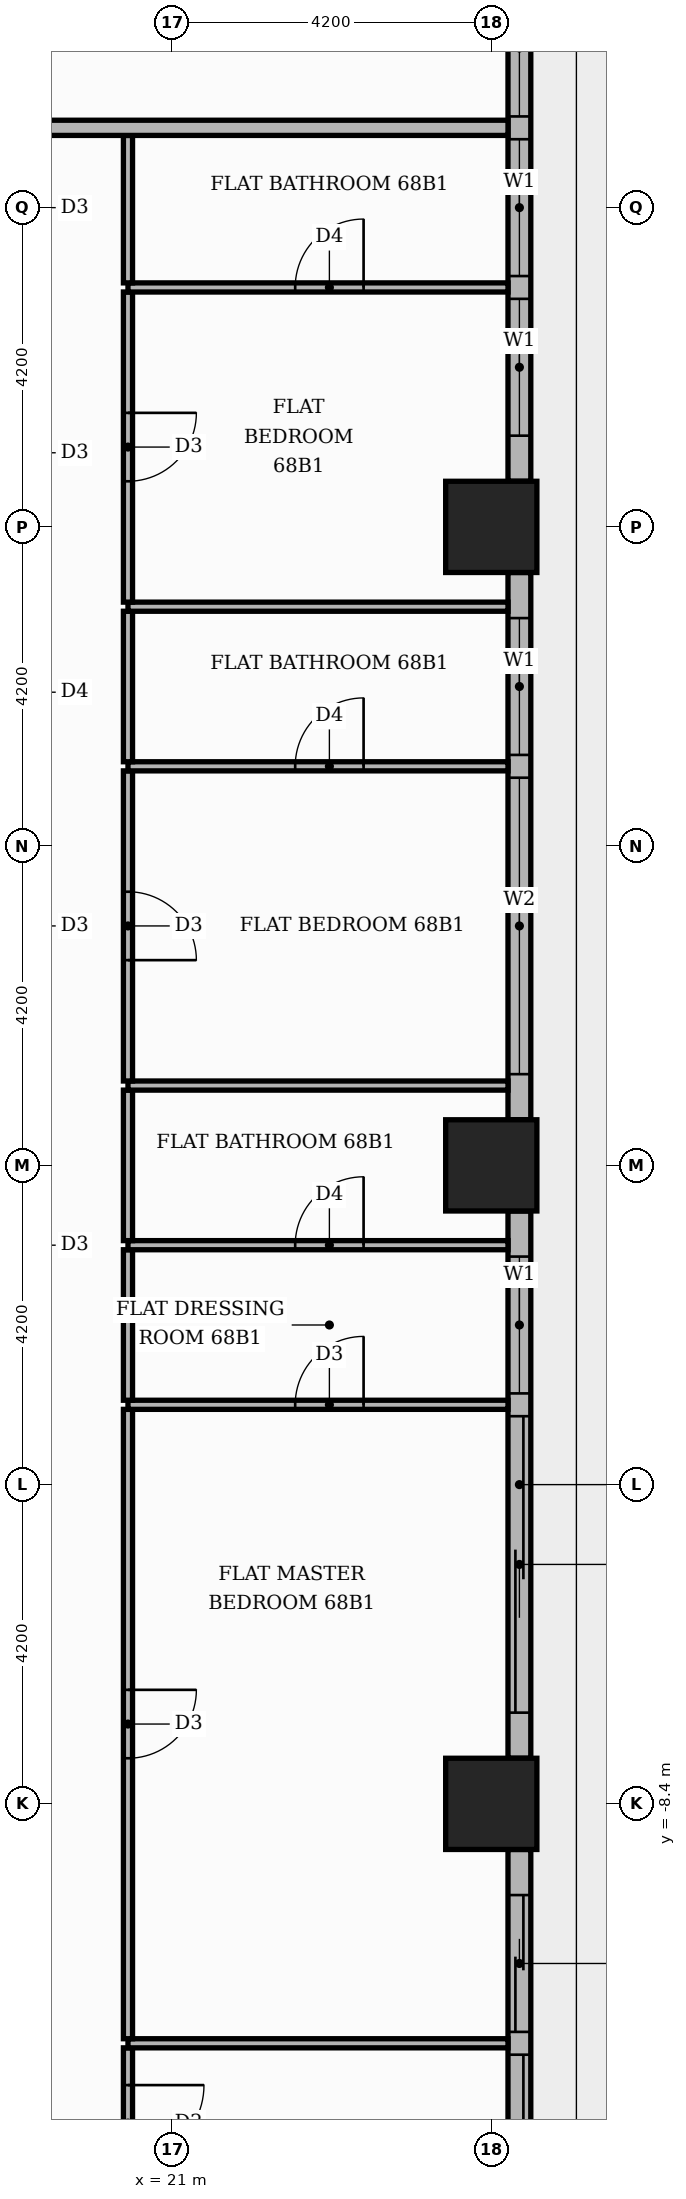
"""IFC4 building model, lengths in metres.
Left out: names, types, materials, properties, quantities, classifications, styles, units other than length and angle.
Written with IfcOpenShell. Run it as: python <this file> out.ifc"""

import sys

from ifc_helpers import new_model, si_unit, direction, frame, frame_2d, origin, origin_2d, place, context, subcontext, project, spatial, rectangle, extrude, element, fill, save


model = new_model("IFC4")
c1 = context("Model", 3, precision=1e-05, world=origin(), true_north=direction((0.0, 1.0)))
c2 = subcontext(c1, "Body", "Model", "MODEL_VIEW")
j1 = project(units=[si_unit("LENGTHUNIT", "METRE"), si_unit("PLANEANGLEUNIT", "RADIAN")], contexts=[c1])
p1 = place(None, origin())
s1 = spatial("IfcSite", under=j1, at=p1, CompositionType="ELEMENT")
p2 = place(p1, origin())
s2 = spatial("IfcBuilding", under=s1, at=p2, CompositionType="ELEMENT")
p3 = place(p2, frame((0.0, 0.0, 283.5)))
s3 = spatial("IfcBuildingStorey", under=s2, at=p3, CompositionType="ELEMENT", Elevation=283.5)
for number, where, z_axis, x_axis in (
    (1, (25.2, 0.0, 0.0), (0.0, 0.0, 1.0), (1.0, 0.0, 0.0)),
    (2, (25.2, 8.4, 0.0), (0.0, 0.0, 1.0), (1.0, 0.0, 0.0)),
    (3, (25.2, -8.4, 0.0), (0.0, 0.0, 1.0), (1.0, 0.0, 0.0)),
):
    element("IfcColumn", number, at=place(p3, frame(where, z_axis=z_axis, x_axis=x_axis)), inside=s3, PredefinedType="COLUMN", context=c2, shape_type="SweptSolid", body=[
        extrude(rectangle(XDim=1.2, YDim=1.2, at=origin_2d()), origin(), (0.0, 0.0, 1.0), 3.9),
    ])
p4 = place(p3, frame((25.57, -16.2, 0.0), z_axis=(0.0, 0.0, 1.0), x_axis=(0.0, 1.0, 0.0)))
e4 = element("IfcWall", 4, at=p4, inside=s3, PredefinedType="STANDARD", context=c2, shape_type="SweptSolid", body=[
    extrude(rectangle(XDim=7.2, YDim=0.3, at=frame_2d((3.6, 0.0))), origin(), (0.0, 0.0, 1.0), 3.4),
])
p5 = place(p4, frame((0.6, 0.0, 0.0)))
e5 = element("IfcOpeningElement", 5, at=p5, cuts=e4, PredefinedType="OPENING", context=c2, shape_type="SweptSolid", body=[
    extrude(rectangle(XDim=3.9, YDim=2.4, at=frame_2d((1.95, 1.2))), frame((0.0, 0.16, 0.0), z_axis=(0.0, -1.0, 0.0), x_axis=(1.0, 0.0, 0.0)), (0.0, 0.0, 1.0), 0.32),
])
p6 = place(p4, frame((4.8, 0.0, 0.0)))
e6 = element("IfcOpeningElement", 6, at=p6, cuts=e4, PredefinedType="OPENING", context=c2, shape_type="SweptSolid", body=[
    extrude(rectangle(XDim=1.8, YDim=2.4, at=frame_2d((0.9, 1.2))), frame((0.0, 0.16, 0.0), z_axis=(0.0, -1.0, 0.0), x_axis=(1.0, 0.0, 0.0)), (0.0, 0.0, 1.0), 0.32),
])
p7 = place(p3, frame((25.57, -7.8, 0.0), z_axis=(0.0, 0.0, 1.0), x_axis=(0.0, 1.0, 0.0)))
e7 = element("IfcWall", 7, at=p7, inside=s3, PredefinedType="STANDARD", context=c2, shape_type="SweptSolid", body=[
    extrude(rectangle(XDim=7.2, YDim=0.3, at=frame_2d((3.6, 0.0))), origin(), (0.0, 0.0, 1.0), 3.4),
])
p8 = place(p7, frame((0.6, 0.0, 0.0)))
e8 = element("IfcOpeningElement", 8, at=p8, cuts=e7, PredefinedType="OPENING", context=c2, shape_type="SweptSolid", body=[
    extrude(rectangle(XDim=3.9, YDim=2.4, at=frame_2d((1.95, 1.2))), frame((0.0, 0.16, 0.0), z_axis=(0.0, -1.0, 0.0), x_axis=(1.0, 0.0, 0.0)), (0.0, 0.0, 1.0), 0.32),
])
p9 = place(p7, frame((4.8, 0.0, 0.9)))
e9 = element("IfcOpeningElement", 9, at=p9, cuts=e7, PredefinedType="OPENING", context=c2, shape_type="SweptSolid", body=[
    extrude(rectangle(XDim=1.8, YDim=2.1, at=frame_2d((0.9, 1.05))), frame((0.0, 0.16, 0.0), z_axis=(0.0, -1.0, 0.0), x_axis=(1.0, 0.0, 0.0)), (0.0, 0.0, 1.0), 0.32),
])
p10 = place(p3, frame((25.57, 0.6, 0.0), z_axis=(0.0, 0.0, 1.0), x_axis=(0.0, 1.0, 0.0)))
e10 = element("IfcWall", 10, at=p10, inside=s3, PredefinedType="STANDARD", context=c2, shape_type="SweptSolid", body=[
    extrude(rectangle(XDim=7.2, YDim=0.3, at=frame_2d((3.6, 0.0))), origin(), (0.0, 0.0, 1.0), 3.4),
])
p11 = place(p10, frame((0.6, 0.0, 0.9)))
e11 = element("IfcOpeningElement", 11, at=p11, cuts=e10, PredefinedType="OPENING", context=c2, shape_type="SweptSolid", body=[
    extrude(rectangle(XDim=3.9, YDim=2.1, at=frame_2d((1.95, 1.05))), frame((0.0, 0.16, 0.0), z_axis=(0.0, -1.0, 0.0), x_axis=(1.0, 0.0, 0.0)), (0.0, 0.0, 1.0), 0.32),
])
p12 = place(p10, frame((4.8, 0.0, 0.9)))
e12 = element("IfcOpeningElement", 12, at=p12, cuts=e10, PredefinedType="OPENING", context=c2, shape_type="SweptSolid", body=[
    extrude(rectangle(XDim=1.8, YDim=2.1, at=frame_2d((0.9, 1.05))), frame((0.0, 0.16, 0.0), z_axis=(0.0, -1.0, 0.0), x_axis=(1.0, 0.0, 0.0)), (0.0, 0.0, 1.0), 0.32),
])
p13 = place(p3, frame((25.57, 9.0, 0.0), z_axis=(0.0, 0.0, 1.0), x_axis=(0.0, 1.0, 0.0)))
e13 = element("IfcWall", 13, at=p13, inside=s3, PredefinedType="STANDARD", context=c2, shape_type="SweptSolid", body=[
    extrude(rectangle(XDim=7.2, YDim=0.3, at=frame_2d((3.6, 0.0))), origin(), (0.0, 0.0, 1.0), 3.4),
])
p14 = place(p13, frame((0.6, 0.0, 0.9)))
e14 = element("IfcOpeningElement", 14, at=p14, cuts=e13, PredefinedType="OPENING", context=c2, shape_type="SweptSolid", body=[
    extrude(rectangle(XDim=1.8, YDim=2.1, at=frame_2d((0.9, 1.05))), frame((0.0, 0.16, 0.0), z_axis=(0.0, -1.0, 0.0), x_axis=(1.0, 0.0, 0.0)), (0.0, 0.0, 1.0), 0.32),
])
p15 = place(p13, frame((2.7, 0.0, 0.9)))
e15 = element("IfcOpeningElement", 15, at=p15, cuts=e13, PredefinedType="OPENING", context=c2, shape_type="SweptSolid", body=[
    extrude(rectangle(XDim=1.8, YDim=2.1, at=frame_2d((0.9, 1.05))), frame((0.0, 0.16, 0.0), z_axis=(0.0, -1.0, 0.0), x_axis=(1.0, 0.0, 0.0)), (0.0, 0.0, 1.0), 0.32),
])
p16 = place(p13, frame((4.8, 0.0, 0.9)))
e16 = element("IfcOpeningElement", 16, at=p16, cuts=e13, PredefinedType="OPENING", context=c2, shape_type="SweptSolid", body=[
    extrude(rectangle(XDim=1.8, YDim=2.1, at=frame_2d((0.9, 1.05))), frame((0.0, 0.16, 0.0), z_axis=(0.0, -1.0, 0.0), x_axis=(1.0, 0.0, 0.0)), (0.0, 0.0, 1.0), 0.32),
])
p17 = place(p3, frame((20.42, -13.59, 0.0), z_axis=(0.0, 0.0, 1.0), x_axis=(0.0, 1.0, 0.0)))
e17 = element("IfcWall", 17, at=p17, inside=s3, PredefinedType="PARTITIONING", context=c2, shape_type="SweptSolid", body=[
    extrude(rectangle(XDim=1.98, YDim=0.12, at=frame_2d((0.99, 0.0))), origin(), (0.0, 0.0, 1.0), 3.4),
])
p18 = place(p17, frame((0.49, 0.0, 0.0)))
e18 = element("IfcOpeningElement", 18, at=p18, cuts=e17, PredefinedType="OPENING", context=c2, shape_type="SweptSolid", body=[
    extrude(rectangle(XDim=1.0, YDim=2.1, at=frame_2d((0.5, 1.05))), frame((0.0, 0.07, 0.0), z_axis=(0.0, -1.0, 0.0), x_axis=(1.0, 0.0, 0.0)), (0.0, 0.0, 1.0), 0.14),
])
p19 = place(p3, frame((20.42, -11.55, 0.0), z_axis=(0.0, 0.0, 1.0), x_axis=(1.0, 0.0, 0.0)))
e19 = element("IfcWall", 19, at=p19, inside=s3, PredefinedType="PARTITIONING", context=c2, shape_type="SweptSolid", body=[
    extrude(rectangle(XDim=5.0, YDim=0.12, at=frame_2d((2.5, 0.0))), origin(), (0.0, 0.0, 1.0), 3.4),
])
p20 = place(p3, frame((20.42, -11.49, 0.0), z_axis=(0.0, 0.0, 1.0), x_axis=(0.0, 1.0, 0.0)))
e20 = element("IfcWall", 20, at=p20, inside=s3, PredefinedType="PARTITIONING", context=c2, shape_type="SweptSolid", body=[
    extrude(rectangle(XDim=8.28, YDim=0.12, at=frame_2d((4.14, 0.0))), origin(), (0.0, 0.0, 1.0), 3.4),
])
p21 = place(p20, frame((3.69, 0.0, 0.0)))
e21 = element("IfcOpeningElement", 21, at=p21, cuts=e20, PredefinedType="OPENING", context=c2, shape_type="SweptSolid", body=[
    extrude(rectangle(XDim=0.9, YDim=2.1, at=frame_2d((0.45, 1.05))), frame((0.0, 0.07, 0.0), z_axis=(0.0, -1.0, 0.0), x_axis=(1.0, 0.0, 0.0)), (0.0, 0.0, 1.0), 0.14),
])
p22 = place(p3, frame((20.42, -3.15, 0.0), z_axis=(0.0, 0.0, 1.0), x_axis=(1.0, 0.0, 0.0)))
e22 = element("IfcWall", 22, at=p22, inside=s3, PredefinedType="PARTITIONING", context=c2, shape_type="SweptSolid", body=[
    extrude(rectangle(XDim=5.0, YDim=0.12, at=frame_2d((2.5, 0.0))), origin(), (0.0, 0.0, 1.0), 3.4),
])
p23 = place(p22, frame((2.2, 0.0, 0.0)))
e23 = element("IfcOpeningElement", 23, at=p23, cuts=e22, PredefinedType="OPENING", context=c2, shape_type="SweptSolid", body=[
    extrude(rectangle(XDim=0.9, YDim=2.1, at=frame_2d((0.45, 1.05))), frame((0.0, 0.07, 0.0), z_axis=(0.0, -1.0, 0.0), x_axis=(1.0, 0.0, 0.0)), (0.0, 0.0, 1.0), 0.14),
])
p24 = place(p3, frame((20.42, -3.09, 0.0), z_axis=(0.0, 0.0, 1.0), x_axis=(0.0, 1.0, 0.0)))
e24 = element("IfcWall", 24, at=p24, inside=s3, PredefinedType="PARTITIONING", context=c2, shape_type="SweptSolid", body=[
    extrude(rectangle(XDim=1.98, YDim=0.12, at=frame_2d((0.99, 0.0))), origin(), (0.0, 0.0, 1.0), 3.4),
])
p25 = place(p3, frame((20.42, -1.05, 0.0), z_axis=(0.0, 0.0, 1.0), x_axis=(1.0, 0.0, 0.0)))
e25 = element("IfcWall", 25, at=p25, inside=s3, PredefinedType="PARTITIONING", context=c2, shape_type="SweptSolid", body=[
    extrude(rectangle(XDim=5.0, YDim=0.12, at=frame_2d((2.5, 0.0))), origin(), (0.0, 0.0, 1.0), 3.4),
])
p26 = place(p25, frame((2.2, 0.0, 0.0)))
e26 = element("IfcOpeningElement", 26, at=p26, cuts=e25, PredefinedType="OPENING", context=c2, shape_type="SweptSolid", body=[
    extrude(rectangle(XDim=0.9, YDim=2.1, at=frame_2d((0.45, 1.05))), frame((0.0, 0.07, 0.0), z_axis=(0.0, -1.0, 0.0), x_axis=(1.0, 0.0, 0.0)), (0.0, 0.0, 1.0), 0.14),
])
p27 = place(p3, frame((20.42, -0.99, 0.0), z_axis=(0.0, 0.0, 1.0), x_axis=(0.0, 1.0, 0.0)))
e27 = element("IfcWall", 27, at=p27, inside=s3, PredefinedType="PARTITIONING", context=c2, shape_type="SweptSolid", body=[
    extrude(rectangle(XDim=1.98, YDim=0.12, at=frame_2d((0.99, 0.0))), origin(), (0.0, 0.0, 1.0), 3.4),
])
p28 = place(p3, frame((20.42, 1.05, 0.0), z_axis=(0.0, 0.0, 1.0), x_axis=(1.0, 0.0, 0.0)))
e28 = element("IfcWall", 28, at=p28, inside=s3, PredefinedType="PARTITIONING", context=c2, shape_type="SweptSolid", body=[
    extrude(rectangle(XDim=5.0, YDim=0.12, at=frame_2d((2.5, 0.0))), origin(), (0.0, 0.0, 1.0), 3.4),
])
p29 = place(p3, frame((20.42, 1.11, 0.0), z_axis=(0.0, 0.0, 1.0), x_axis=(0.0, 1.0, 0.0)))
e29 = element("IfcWall", 29, at=p29, inside=s3, PredefinedType="PARTITIONING", context=c2, shape_type="SweptSolid", body=[
    extrude(rectangle(XDim=4.08, YDim=0.12, at=frame_2d((2.04, 0.0))), origin(), (0.0, 0.0, 1.0), 3.4),
])
p30 = place(p29, frame((1.59, 0.0, 0.0)))
e30 = element("IfcOpeningElement", 30, at=p30, cuts=e29, PredefinedType="OPENING", context=c2, shape_type="SweptSolid", body=[
    extrude(rectangle(XDim=0.9, YDim=2.1, at=frame_2d((0.45, 1.05))), frame((0.0, 0.07, 0.0), z_axis=(0.0, -1.0, 0.0), x_axis=(1.0, 0.0, 0.0)), (0.0, 0.0, 1.0), 0.14),
])
p31 = place(p3, frame((20.42, 5.25, 0.0), z_axis=(0.0, 0.0, 1.0), x_axis=(1.0, 0.0, 0.0)))
e31 = element("IfcWall", 31, at=p31, inside=s3, PredefinedType="PARTITIONING", context=c2, shape_type="SweptSolid", body=[
    extrude(rectangle(XDim=5.0, YDim=0.12, at=frame_2d((2.5, 0.0))), origin(), (0.0, 0.0, 1.0), 3.4),
])
p32 = place(p31, frame((2.2, 0.0, 0.0)))
e32 = element("IfcOpeningElement", 32, at=p32, cuts=e31, PredefinedType="OPENING", context=c2, shape_type="SweptSolid", body=[
    extrude(rectangle(XDim=0.9, YDim=2.1, at=frame_2d((0.45, 1.05))), frame((0.0, 0.07, 0.0), z_axis=(0.0, -1.0, 0.0), x_axis=(1.0, 0.0, 0.0)), (0.0, 0.0, 1.0), 0.14),
])
p33 = place(p3, frame((20.42, 5.31, 0.0), z_axis=(0.0, 0.0, 1.0), x_axis=(0.0, 1.0, 0.0)))
e33 = element("IfcWall", 33, at=p33, inside=s3, PredefinedType="PARTITIONING", context=c2, shape_type="SweptSolid", body=[
    extrude(rectangle(XDim=1.98, YDim=0.12, at=frame_2d((0.99, 0.0))), origin(), (0.0, 0.0, 1.0), 3.4),
])
p34 = place(p3, frame((20.42, 7.35, 0.0), z_axis=(0.0, 0.0, 1.0), x_axis=(1.0, 0.0, 0.0)))
e34 = element("IfcWall", 34, at=p34, inside=s3, PredefinedType="PARTITIONING", context=c2, shape_type="SweptSolid", body=[
    extrude(rectangle(XDim=5.0, YDim=0.12, at=frame_2d((2.5, 0.0))), origin(), (0.0, 0.0, 1.0), 3.4),
])
p35 = place(p3, frame((20.42, 7.41, 0.0), z_axis=(0.0, 0.0, 1.0), x_axis=(0.0, 1.0, 0.0)))
e35 = element("IfcWall", 35, at=p35, inside=s3, PredefinedType="PARTITIONING", context=c2, shape_type="SweptSolid", body=[
    extrude(rectangle(XDim=4.08, YDim=0.12, at=frame_2d((2.04, 0.0))), origin(), (0.0, 0.0, 1.0), 3.4),
])
p36 = place(p35, frame((1.59, 0.0, 0.0)))
e36 = element("IfcOpeningElement", 36, at=p36, cuts=e35, PredefinedType="OPENING", context=c2, shape_type="SweptSolid", body=[
    extrude(rectangle(XDim=0.9, YDim=2.1, at=frame_2d((0.45, 1.05))), frame((0.0, 0.07, 0.0), z_axis=(0.0, -1.0, 0.0), x_axis=(1.0, 0.0, 0.0)), (0.0, 0.0, 1.0), 0.14),
])
p37 = place(p3, frame((20.42, 11.55, 0.0), z_axis=(0.0, 0.0, 1.0), x_axis=(1.0, 0.0, 0.0)))
e37 = element("IfcWall", 37, at=p37, inside=s3, PredefinedType="PARTITIONING", context=c2, shape_type="SweptSolid", body=[
    extrude(rectangle(XDim=5.0, YDim=0.12, at=frame_2d((2.5, 0.0))), origin(), (0.0, 0.0, 1.0), 3.4),
])
p38 = place(p37, frame((2.2, 0.0, 0.0)))
e38 = element("IfcOpeningElement", 38, at=p38, cuts=e37, PredefinedType="OPENING", context=c2, shape_type="SweptSolid", body=[
    extrude(rectangle(XDim=0.9, YDim=2.1, at=frame_2d((0.45, 1.05))), frame((0.0, 0.07, 0.0), z_axis=(0.0, -1.0, 0.0), x_axis=(1.0, 0.0, 0.0)), (0.0, 0.0, 1.0), 0.14),
])
p39 = place(p3, frame((20.42, 11.61, 0.0), z_axis=(0.0, 0.0, 1.0), x_axis=(0.0, 1.0, 0.0)))
e39 = element("IfcWall", 39, at=p39, inside=s3, PredefinedType="PARTITIONING", context=c2, shape_type="SweptSolid", body=[
    extrude(rectangle(XDim=1.94, YDim=0.12, at=frame_2d((0.97, 0.0))), origin(), (0.0, 0.0, 1.0), 3.4),
])
p40 = place(p3, frame((-13.65, 13.65, 0.0), z_axis=(0.0, 0.0, 1.0), x_axis=(1.0, 0.0, 0.0)))
e40 = element("IfcWall", 40, at=p40, inside=s3, PredefinedType="PARTITIONING", context=c2, shape_type="SweptSolid", body=[
    extrude(rectangle(XDim=39.07, YDim=0.2, at=frame_2d((19.535, 0.0))), origin(), (0.0, 0.0, 1.0), 3.4),
])
p41 = place(p40, frame((23.6, 0.0, 0.0)))
e41 = element("IfcOpeningElement", 41, at=p41, cuts=e40, PredefinedType="OPENING", context=c2, shape_type="SweptSolid", body=[
    extrude(rectangle(XDim=1.1, YDim=2.4, at=frame_2d((0.55, 1.2))), frame((0.0, 0.11, 0.0), z_axis=(0.0, -1.0, 0.0), x_axis=(1.0, 0.0, 0.0)), (0.0, 0.0, 1.0), 0.22),
])
p42 = place(p5, origin())
e42 = element("IfcDoor", 42, at=p42, inside=s3, OperationType="SLIDING_TO_LEFT", PredefinedType="DOOR", context=c2, shape_type="SweptSolid", body=[
    extrude(rectangle(XDim=3.9, YDim=2.4, at=frame_2d((1.95, 1.2))), frame((0.0, 0.025, 0.0), z_axis=(0.0, -1.0, 0.0), x_axis=(1.0, 0.0, 0.0)), (0.0, 0.0, 1.0), 0.05),
])
fill(e5, e42)
p43 = place(p6, origin())
e43 = element("IfcDoor", 43, at=p43, inside=s3, OperationType="SLIDING_TO_RIGHT", PredefinedType="DOOR", context=c2, shape_type="SweptSolid", body=[
    extrude(rectangle(XDim=1.8, YDim=2.4, at=frame_2d((0.9, 1.2))), frame((0.0, 0.025, 0.0), z_axis=(0.0, -1.0, 0.0), x_axis=(1.0, 0.0, 0.0)), (0.0, 0.0, 1.0), 0.05),
])
fill(e6, e43)
p44 = place(p8, origin())
e44 = element("IfcDoor", 44, at=p44, inside=s3, OperationType="SLIDING_TO_LEFT", PredefinedType="DOOR", context=c2, shape_type="SweptSolid", body=[
    extrude(rectangle(XDim=3.9, YDim=2.4, at=frame_2d((1.95, 1.2))), frame((0.0, 0.025, 0.0), z_axis=(0.0, -1.0, 0.0), x_axis=(1.0, 0.0, 0.0)), (0.0, 0.0, 1.0), 0.05),
])
fill(e8, e44)
p45 = place(p9, origin())
e45 = element("IfcWindow", 45, at=p45, inside=s3, PartitioningType="SINGLE_PANEL", PredefinedType="WINDOW", context=c2, shape_type="SweptSolid", body=[
    extrude(rectangle(XDim=1.8, YDim=2.1, at=frame_2d((0.9, 1.05))), frame((0.0, 0.03, 0.0), z_axis=(0.0, -1.0, 0.0), x_axis=(1.0, 0.0, 0.0)), (0.0, 0.0, 1.0), 0.06),
])
fill(e9, e45)
p46 = place(p11, origin())
e46 = element("IfcWindow", 46, at=p46, inside=s3, PartitioningType="SINGLE_PANEL", PredefinedType="WINDOW", context=c2, shape_type="SweptSolid", body=[
    extrude(rectangle(XDim=3.9, YDim=2.1, at=frame_2d((1.95, 1.05))), frame((0.0, 0.03, 0.0), z_axis=(0.0, -1.0, 0.0), x_axis=(1.0, 0.0, 0.0)), (0.0, 0.0, 1.0), 0.06),
])
fill(e11, e46)
p47 = place(p12, origin())
e47 = element("IfcWindow", 47, at=p47, inside=s3, PartitioningType="SINGLE_PANEL", PredefinedType="WINDOW", context=c2, shape_type="SweptSolid", body=[
    extrude(rectangle(XDim=1.8, YDim=2.1, at=frame_2d((0.9, 1.05))), frame((0.0, 0.03, 0.0), z_axis=(0.0, -1.0, 0.0), x_axis=(1.0, 0.0, 0.0)), (0.0, 0.0, 1.0), 0.06),
])
fill(e12, e47)
p48 = place(p14, origin())
e48 = element("IfcWindow", 48, at=p48, inside=s3, PartitioningType="SINGLE_PANEL", PredefinedType="WINDOW", context=c2, shape_type="SweptSolid", body=[
    extrude(rectangle(XDim=1.8, YDim=2.1, at=frame_2d((0.9, 1.05))), frame((0.0, 0.03, 0.0), z_axis=(0.0, -1.0, 0.0), x_axis=(1.0, 0.0, 0.0)), (0.0, 0.0, 1.0), 0.06),
])
fill(e14, e48)
p49 = place(p15, origin())
e49 = element("IfcWindow", 49, at=p49, inside=s3, PartitioningType="SINGLE_PANEL", PredefinedType="WINDOW", context=c2, shape_type="SweptSolid", body=[
    extrude(rectangle(XDim=1.8, YDim=2.1, at=frame_2d((0.9, 1.05))), frame((0.0, 0.03, 0.0), z_axis=(0.0, -1.0, 0.0), x_axis=(1.0, 0.0, 0.0)), (0.0, 0.0, 1.0), 0.06),
])
fill(e15, e49)
p50 = place(p16, origin())
e50 = element("IfcWindow", 50, at=p50, inside=s3, PartitioningType="SINGLE_PANEL", PredefinedType="WINDOW", context=c2, shape_type="SweptSolid", body=[
    extrude(rectangle(XDim=1.8, YDim=2.1, at=frame_2d((0.9, 1.05))), frame((0.0, 0.03, 0.0), z_axis=(0.0, -1.0, 0.0), x_axis=(1.0, 0.0, 0.0)), (0.0, 0.0, 1.0), 0.06),
])
fill(e16, e50)
p51 = place(p18, frame((1.0, 0.0, 0.0), z_axis=(0.0, 0.0, 1.0), x_axis=(-1.0, 0.0, 0.0)))
e51 = element("IfcDoor", 51, at=p51, inside=s3, OperationType="SINGLE_SWING_RIGHT", PredefinedType="DOOR", context=c2, shape_type="SweptSolid", body=[
    extrude(rectangle(XDim=1.0, YDim=2.1, at=frame_2d((0.5, 1.05))), frame((0.0, 0.025, 0.0), z_axis=(0.0, -1.0, 0.0), x_axis=(1.0, 0.0, 0.0)), (0.0, 0.0, 1.0), 0.05),
])
fill(e18, e51)
p52 = place(p21, frame((0.9, 0.0, 0.0), z_axis=(0.0, 0.0, 1.0), x_axis=(-1.0, 0.0, 0.0)))
e52 = element("IfcDoor", 52, at=p52, inside=s3, OperationType="SINGLE_SWING_RIGHT", PredefinedType="DOOR", context=c2, shape_type="SweptSolid", body=[
    extrude(rectangle(XDim=0.9, YDim=2.1, at=frame_2d((0.45, 1.05))), frame((0.0, 0.025, 0.0), z_axis=(0.0, -1.0, 0.0), x_axis=(1.0, 0.0, 0.0)), (0.0, 0.0, 1.0), 0.05),
])
fill(e21, e52)
p53 = place(p23, origin())
e53 = element("IfcDoor", 53, at=p53, inside=s3, OperationType="SINGLE_SWING_RIGHT", PredefinedType="DOOR", context=c2, shape_type="SweptSolid", body=[
    extrude(rectangle(XDim=0.9, YDim=2.1, at=frame_2d((0.45, 1.05))), frame((0.0, 0.025, 0.0), z_axis=(0.0, -1.0, 0.0), x_axis=(1.0, 0.0, 0.0)), (0.0, 0.0, 1.0), 0.05),
])
fill(e23, e53)
p54 = place(p26, origin())
e54 = element("IfcDoor", 54, at=p54, inside=s3, OperationType="SINGLE_SWING_RIGHT", PredefinedType="DOOR", context=c2, shape_type="SweptSolid", body=[
    extrude(rectangle(XDim=0.9, YDim=2.1, at=frame_2d((0.45, 1.05))), frame((0.0, 0.025, 0.0), z_axis=(0.0, -1.0, 0.0), x_axis=(1.0, 0.0, 0.0)), (0.0, 0.0, 1.0), 0.05),
])
fill(e26, e54)
p55 = place(p30, frame((0.9, 0.0, 0.0), z_axis=(0.0, 0.0, 1.0), x_axis=(-1.0, 0.0, 0.0)))
e55 = element("IfcDoor", 55, at=p55, inside=s3, OperationType="SINGLE_SWING_LEFT", PredefinedType="DOOR", context=c2, shape_type="SweptSolid", body=[
    extrude(rectangle(XDim=0.9, YDim=2.1, at=frame_2d((0.45, 1.05))), frame((0.0, 0.025, 0.0), z_axis=(0.0, -1.0, 0.0), x_axis=(1.0, 0.0, 0.0)), (0.0, 0.0, 1.0), 0.05),
])
fill(e30, e55)
p56 = place(p32, origin())
e56 = element("IfcDoor", 56, at=p56, inside=s3, OperationType="SINGLE_SWING_RIGHT", PredefinedType="DOOR", context=c2, shape_type="SweptSolid", body=[
    extrude(rectangle(XDim=0.9, YDim=2.1, at=frame_2d((0.45, 1.05))), frame((0.0, 0.025, 0.0), z_axis=(0.0, -1.0, 0.0), x_axis=(1.0, 0.0, 0.0)), (0.0, 0.0, 1.0), 0.05),
])
fill(e32, e56)
p57 = place(p36, frame((0.9, 0.0, 0.0), z_axis=(0.0, 0.0, 1.0), x_axis=(-1.0, 0.0, 0.0)))
e57 = element("IfcDoor", 57, at=p57, inside=s3, OperationType="SINGLE_SWING_RIGHT", PredefinedType="DOOR", context=c2, shape_type="SweptSolid", body=[
    extrude(rectangle(XDim=0.9, YDim=2.1, at=frame_2d((0.45, 1.05))), frame((0.0, 0.025, 0.0), z_axis=(0.0, -1.0, 0.0), x_axis=(1.0, 0.0, 0.0)), (0.0, 0.0, 1.0), 0.05),
])
fill(e36, e57)
p58 = place(p38, origin())
e58 = element("IfcDoor", 58, at=p58, inside=s3, OperationType="SINGLE_SWING_RIGHT", PredefinedType="DOOR", context=c2, shape_type="SweptSolid", body=[
    extrude(rectangle(XDim=0.9, YDim=2.1, at=frame_2d((0.45, 1.05))), frame((0.0, 0.025, 0.0), z_axis=(0.0, -1.0, 0.0), x_axis=(1.0, 0.0, 0.0)), (0.0, 0.0, 1.0), 0.05),
])
fill(e38, e58)
save(model, sys.argv[1])
